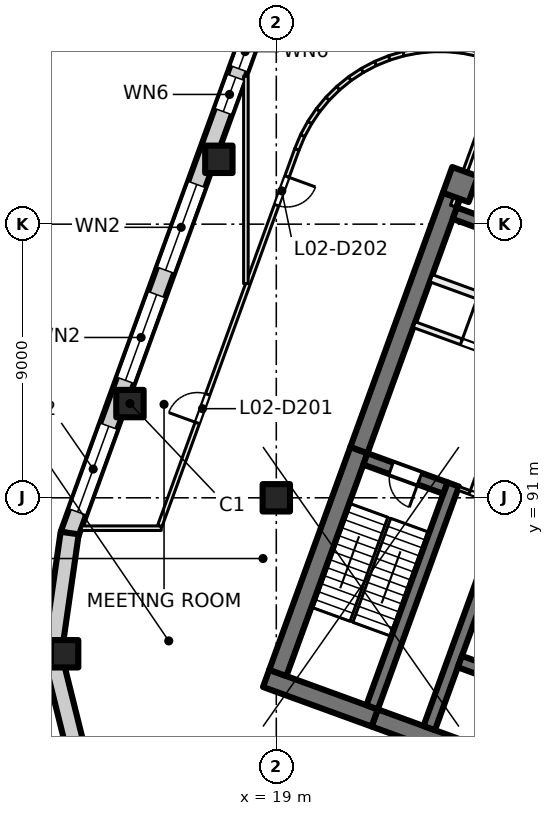
"""IFC4 building model, lengths in metres.
Left out: names, types, materials, properties, quantities, classifications, styles, units other than length and angle.
Written with IfcOpenShell. Run it as: python <this file> out.ifc"""

import sys

from ifc_helpers import new_model, si_unit, direction, frame, frame_2d, origin, origin_2d, place, context, subcontext, project, spatial, rectangle, extrude, element, fill, save


model = new_model("IFC4")
c1 = context("Model", 3, precision=1e-05, world=origin(), true_north=direction((0.0, 1.0)))
c2 = subcontext(c1, "Body", "Model", "MODEL_VIEW")
j1 = project(units=[si_unit("LENGTHUNIT", "METRE"), si_unit("PLANEANGLEUNIT", "RADIAN")], contexts=[c1])
p1 = place(None, origin())
s1 = spatial("IfcSite", under=j1, at=p1, CompositionType="ELEMENT")
p2 = place(p1, origin())
s2 = spatial("IfcBuilding", under=s1, at=p2, CompositionType="ELEMENT")
p3 = place(p2, frame((0.0, 0.0, 12.5)))
s3 = spatial("IfcBuildingStorey", under=s2, at=p3, CompositionType="ELEMENT", Elevation=12.5)
for number, where, z_axis, x_axis in (
    (1, (19.0, 91.0, 0.0), (0.0, 0.0, 1.0), (1.0, 0.0, 0.0)),
    (2, (12.038, 85.869, 0.0), (0.0, 0.0, 1.0), (1.0, 0.0, 0.0)),
    (3, (14.187, 94.099, 0.0), (0.0, 0.0, 1.0), (1.0, 0.0, 0.0)),
    (4, (17.111, 102.133, 0.0), (0.0, 0.0, 1.0), (1.0, 0.0, 0.0)),
    (5, (25.056, 101.303, 0.0), (0.0, 0.0, 1.0), (-0.342, -0.94, 0.0)),
):
    element("IfcColumn", number, at=place(p3, frame(where, z_axis=z_axis, x_axis=x_axis)), inside=s3, PredefinedType="COLUMN", context=c2, shape_type="SweptSolid", body=[
        extrude(rectangle(XDim=0.9, YDim=0.9, at=origin_2d()), origin(), (0.0, 0.0, 1.0), 5.0),
    ])
p4 = place(p3, frame((35.767, 78.835, 0.0), z_axis=(0.0, 0.0, 1.0), x_axis=(-0.939692894512, 0.342019391267, 0.0)))
e6 = element("IfcWall", 6, at=p4, inside=s3, PredefinedType="SHEAR", context=c2, shape_type="SweptSolid", body=[
    extrude(rectangle(XDim=14.4, YDim=0.6, at=frame_2d((7.2, 0.0))), origin(), (0.0, 0.0, 1.0), 5.0),
])
p5 = place(p3, frame((22.236, 83.76, 0.0), z_axis=(0.0, 0.0, 1.0), x_axis=(-0.939680822529, 0.342052557032, 0.0)))
e7 = element("IfcWall", 7, at=p5, inside=s3, PredefinedType="SHEAR", context=c2, shape_type="SweptSolid", body=[
    extrude(rectangle(XDim=3.8, YDim=0.6, at=frame_2d((1.9, 0.0))), origin(), (0.0, 0.0, 1.0), 5.0),
])
p6 = place(p3, frame((19.05, 85.239, 0.0), z_axis=(0.0, 0.0, 1.0), x_axis=(0.342016982193, 0.939693771338, 0.0)))
e8 = element("IfcWall", 8, at=p6, inside=s3, PredefinedType="SHEAR", context=c2, shape_type="SweptSolid", body=[
    extrude(rectangle(XDim=7.8, YDim=0.6, at=frame_2d((3.9, 0.0))), origin(), (0.0, 0.0, 1.0), 5.0),
])
p7 = place(p3, frame((21.717, 92.568, 0.0), z_axis=(0.0, 0.0, 1.0), x_axis=(0.342016162452, 0.939694069696, 0.0)))
e9 = element("IfcWall", 9, at=p7, inside=s3, PredefinedType="SHEAR", context=c2, shape_type="SweptSolid", body=[
    extrude(rectangle(XDim=8.9, YDim=0.6, at=frame_2d((4.45, 0.0))), origin(), (0.0, 0.0, 1.0), 5.0),
])
p8 = place(p3, frame((22.15, 84.11, 0.0), z_axis=(0.0, 0.0, 1.0), x_axis=(0.342016982193, 0.939693771338, 0.0)))
e10 = element("IfcWall", 10, at=p8, inside=s3, PredefinedType="SHEAR", context=c2, shape_type="SweptSolid", body=[
    extrude(rectangle(XDim=7.8, YDim=0.4, at=frame_2d((3.9, 0.0))), origin(), (0.0, 0.0, 1.0), 5.0),
])
p9 = place(p3, frame((24.562, 91.32, 0.0), z_axis=(0.0, 0.0, 1.0), x_axis=(-0.939717030584, 0.341953070509, 0.0)))
e11 = element("IfcWall", 11, at=p9, inside=s3, PredefinedType="SHEAR", context=c2, shape_type="SweptSolid", body=[
    extrude(rectangle(XDim=2.8, YDim=0.4, at=frame_2d((1.4, 0.0))), origin(), (0.0, 0.0, 1.0), 5.0),
])
p10 = place(p9, frame((0.9, 0.0, 0.0)))
e12 = element("IfcOpeningElement", 12, at=p10, cuts=e11, PredefinedType="OPENING", context=c2, shape_type="SweptSolid", body=[
    extrude(rectangle(XDim=1.0, YDim=2.1, at=frame_2d((0.5, 1.05))), frame((0.0, 0.21, 0.0), z_axis=(0.0, -1.0, 0.0), x_axis=(1.0, 0.0, 0.0)), (0.0, 0.0, 1.0), 0.42),
])
p11 = place(p3, frame((24.03, 83.426, 0.0), z_axis=(0.0, 0.0, 1.0), x_axis=(0.342014590177, 0.939694641948, 0.0)))
e13 = element("IfcWall", 13, at=p11, inside=s3, PredefinedType="SHEAR", context=c2, shape_type="SweptSolid", body=[
    extrude(rectangle(XDim=12.2, YDim=0.4, at=frame_2d((6.1, 0.0))), origin(), (0.0, 0.0, 1.0), 5.0),
])
p12 = place(p11, frame((7.9, 0.0, 0.0)))
e14 = element("IfcOpeningElement", 14, at=p12, cuts=e13, PredefinedType="OPENING", context=c2, shape_type="SweptSolid", body=[
    extrude(rectangle(XDim=1.1, YDim=2.1, at=frame_2d((0.55, 1.05))), frame((0.0, 0.21, 0.0), z_axis=(0.0, -1.0, 0.0), x_axis=(1.0, 0.0, 0.0)), (0.0, 0.0, 1.0), 0.42),
])
p13 = place(p3, frame((27.858, 84.587, 0.0), z_axis=(0.0, 0.0, 1.0), x_axis=(-0.939686455819, 0.342037080957, 0.0)))
e15 = element("IfcWall", 15, at=p13, inside=s3, PredefinedType="SHEAR", context=c2, shape_type="SweptSolid", body=[
    extrude(rectangle(XDim=3.0, YDim=0.4, at=frame_2d((1.5, 0.0))), origin(), (0.0, 0.0, 1.0), 5.0),
])
p14 = place(p3, frame((32.953, 97.418, 0.0), z_axis=(0.0, 0.0, 1.0), x_axis=(-0.93969060187, 0.342025690201, 0.0)))
e16 = element("IfcWall", 16, at=p14, inside=s3, PredefinedType="SHEAR", context=c2, shape_type="SweptSolid", body=[
    extrude(rectangle(XDim=8.6, YDim=0.4, at=frame_2d((4.3, 0.0))), origin(), (0.0, 0.0, 1.0), 5.0),
])
p15 = place(p3, frame((12.199, 89.809, 0.0), z_axis=(0.0, 0.0, 1.0), x_axis=(0.342022998908, 0.939691581434, 0.0)))
e17 = element("IfcWall", 17, at=p15, inside=s3, PredefinedType="SOLIDWALL", context=c2, shape_type="SweptSolid", body=[
    extrude(rectangle(XDim=47.334, YDim=0.6, at=frame_2d((23.667, 0.0))), origin(), (0.0, 0.0, 1.0), 4.6),
])
p16 = place(p15, frame((0.773, 0.0, 0.9)))
e18 = element("IfcOpeningElement", 18, at=p16, cuts=e17, PredefinedType="OPENING", context=c2, shape_type="SweptSolid", body=[
    extrude(rectangle(XDim=3.0, YDim=3.0, at=frame_2d((1.5, 1.5))), frame((0.0, 0.31, 0.0), z_axis=(0.0, -1.0, 0.0), x_axis=(1.0, 0.0, 0.0)), (0.0, 0.0, 1.0), 0.62),
])
p17 = place(p15, frame((5.379, 0.0, 0.9)))
e19 = element("IfcOpeningElement", 19, at=p17, cuts=e17, PredefinedType="OPENING", context=c2, shape_type="SweptSolid", body=[
    extrude(rectangle(XDim=3.0, YDim=3.0, at=frame_2d((1.5, 1.5))), frame((0.0, 0.31, 0.0), z_axis=(0.0, -1.0, 0.0), x_axis=(1.0, 0.0, 0.0)), (0.0, 0.0, 1.0), 0.62),
])
p18 = place(p15, frame((9.235, 0.0, 0.9)))
e20 = element("IfcOpeningElement", 20, at=p18, cuts=e17, PredefinedType="OPENING", context=c2, shape_type="SweptSolid", body=[
    extrude(rectangle(XDim=3.0, YDim=3.0, at=frame_2d((1.5, 1.5))), frame((0.0, 0.31, 0.0), z_axis=(0.0, -1.0, 0.0), x_axis=(1.0, 0.0, 0.0)), (0.0, 0.0, 1.0), 0.62),
])
p19 = place(p15, frame((14.786, 0.0, 0.9)))
e21 = element("IfcOpeningElement", 21, at=p19, cuts=e17, PredefinedType="OPENING", context=c2, shape_type="SweptSolid", body=[
    extrude(rectangle(XDim=1.2, YDim=3.0, at=frame_2d((0.6, 1.5))), frame((0.0, 0.31, 0.0), z_axis=(0.0, -1.0, 0.0), x_axis=(1.0, 0.0, 0.0)), (0.0, 0.0, 1.0), 0.62),
])
p20 = place(p15, frame((16.286, 0.0, 0.9)))
e22 = element("IfcOpeningElement", 22, at=p20, cuts=e17, PredefinedType="OPENING", context=c2, shape_type="SweptSolid", body=[
    extrude(rectangle(XDim=1.2, YDim=3.0, at=frame_2d((0.6, 1.5))), frame((0.0, 0.31, 0.0), z_axis=(0.0, -1.0, 0.0), x_axis=(1.0, 0.0, 0.0)), (0.0, 0.0, 1.0), 0.62),
])
p21 = place(p15, frame((18.118, 0.0, 0.9)))
e23 = element("IfcOpeningElement", 23, at=p21, cuts=e17, PredefinedType="OPENING", context=c2, shape_type="SweptSolid", body=[
    extrude(rectangle(XDim=1.2, YDim=3.0, at=frame_2d((0.6, 1.5))), frame((0.0, 0.31, 0.0), z_axis=(0.0, -1.0, 0.0), x_axis=(1.0, 0.0, 0.0)), (0.0, 0.0, 1.0), 0.62),
])
p22 = place(p15, frame((19.618, 0.0, 0.9)))
e24 = element("IfcOpeningElement", 24, at=p22, cuts=e17, PredefinedType="OPENING", context=c2, shape_type="SweptSolid", body=[
    extrude(rectangle(XDim=1.2, YDim=3.0, at=frame_2d((0.6, 1.5))), frame((0.0, 0.31, 0.0), z_axis=(0.0, -1.0, 0.0), x_axis=(1.0, 0.0, 0.0)), (0.0, 0.0, 1.0), 0.62),
])
p23 = place(p15, frame((22.452, 0.0, 0.9)))
e25 = element("IfcOpeningElement", 25, at=p23, cuts=e17, PredefinedType="OPENING", context=c2, shape_type="SweptSolid", body=[
    extrude(rectangle(XDim=3.0, YDim=3.0, at=frame_2d((1.5, 1.5))), frame((0.0, 0.31, 0.0), z_axis=(0.0, -1.0, 0.0), x_axis=(1.0, 0.0, 0.0)), (0.0, 0.0, 1.0), 0.62),
])
p24 = place(p15, frame((26.458, 0.0, 0.9)))
e26 = element("IfcOpeningElement", 26, at=p24, cuts=e17, PredefinedType="OPENING", context=c2, shape_type="SweptSolid", body=[
    extrude(rectangle(XDim=3.0, YDim=3.0, at=frame_2d((1.5, 1.5))), frame((0.0, 0.31, 0.0), z_axis=(0.0, -1.0, 0.0), x_axis=(1.0, 0.0, 0.0)), (0.0, 0.0, 1.0), 0.62),
])
p25 = place(p15, frame((31.064, 0.0, 0.9)))
e27 = element("IfcOpeningElement", 27, at=p25, cuts=e17, PredefinedType="OPENING", context=c2, shape_type="SweptSolid", body=[
    extrude(rectangle(XDim=3.0, YDim=3.0, at=frame_2d((1.5, 1.5))), frame((0.0, 0.31, 0.0), z_axis=(0.0, -1.0, 0.0), x_axis=(1.0, 0.0, 0.0)), (0.0, 0.0, 1.0), 0.62),
])
p26 = place(p15, frame((36.029, 0.0, 0.9)))
e28 = element("IfcOpeningElement", 28, at=p26, cuts=e17, PredefinedType="OPENING", context=c2, shape_type="SweptSolid", body=[
    extrude(rectangle(XDim=1.2, YDim=3.0, at=frame_2d((0.6, 1.5))), frame((0.0, 0.31, 0.0), z_axis=(0.0, -1.0, 0.0), x_axis=(1.0, 0.0, 0.0)), (0.0, 0.0, 1.0), 0.62),
])
p27 = place(p15, frame((39.676, 0.0, 0.9)))
e29 = element("IfcOpeningElement", 29, at=p27, cuts=e17, PredefinedType="OPENING", context=c2, shape_type="SweptSolid", body=[
    extrude(rectangle(XDim=3.0, YDim=3.0, at=frame_2d((1.5, 1.5))), frame((0.0, 0.31, 0.0), z_axis=(0.0, -1.0, 0.0), x_axis=(1.0, 0.0, 0.0)), (0.0, 0.0, 1.0), 0.62),
])
p28 = place(p15, frame((43.531, 0.0, 0.9)))
e30 = element("IfcOpeningElement", 30, at=p28, cuts=e17, PredefinedType="OPENING", context=c2, shape_type="SweptSolid", body=[
    extrude(rectangle(XDim=3.0, YDim=3.0, at=frame_2d((1.5, 1.5))), frame((0.0, 0.31, 0.0), z_axis=(0.0, -1.0, 0.0), x_axis=(1.0, 0.0, 0.0)), (0.0, 0.0, 1.0), 0.62),
])
p29 = place(p3, frame((11.641, 85.92, 0.0), z_axis=(0.0, 0.0, 1.0), x_axis=(0.142240980655, 0.989832058191, 0.0)))
e31 = element("IfcWall", 31, at=p29, inside=s3, PredefinedType="SOLIDWALL", context=c2, shape_type="SweptSolid", body=[
    extrude(rectangle(XDim=3.961, YDim=0.6, at=frame_2d((1.981, 0.0))), origin(), (0.0, 0.0, 1.0), 4.6),
])
p30 = place(p3, frame((12.571, 82.061, 0.0), z_axis=(0.0, 0.0, 1.0), x_axis=(-0.240896747667, 0.970550749298, 0.0)))
e32 = element("IfcWall", 32, at=p30, inside=s3, PredefinedType="SOLIDWALL", context=c2, shape_type="SweptSolid", body=[
    extrude(rectangle(XDim=3.962, YDim=0.6, at=frame_2d((1.981, 0.0))), origin(), (0.0, 0.0, 1.0), 4.6),
])
p31 = place(p3, frame((23.538, 96.694, 0.0), z_axis=(0.0, 0.0, 1.0), x_axis=(0.939691552312, -0.342023078919, 0.0)))
e33 = element("IfcWall", 33, at=p31, inside=s3, PredefinedType="PARTITIONING", context=c2, shape_type="SweptSolid", body=[
    extrude(rectangle(XDim=8.4, YDim=0.2, at=frame_2d((4.2, 0.0))), origin(), (0.0, 0.0, 1.0), 4.6),
])
p32 = place(p31, frame((1.65, 0.0, 0.0)))
e34 = element("IfcOpeningElement", 34, at=p32, cuts=e33, PredefinedType="OPENING", context=c2, shape_type="SweptSolid", body=[
    extrude(rectangle(XDim=1.5, YDim=2.1, at=frame_2d((0.75, 1.05))), frame((0.0, 0.11, 0.0), z_axis=(0.0, -1.0, 0.0), x_axis=(1.0, 0.0, 0.0)), (0.0, 0.0, 1.0), 0.22),
])
p33 = place(p3, frame((24.094, 98.221, 0.0), z_axis=(0.0, 0.0, 1.0), x_axis=(0.939691552312, -0.342023078919, 0.0)))
e35 = element("IfcWall", 35, at=p33, inside=s3, PredefinedType="PARTITIONING", context=c2, shape_type="SweptSolid", body=[
    extrude(rectangle(XDim=8.4, YDim=0.25, at=frame_2d((4.2, 0.0))), origin(), (0.0, 0.0, 1.0), 4.6),
])
p34 = place(p33, frame((5.925, 0.0, 0.0)))
e36 = element("IfcOpeningElement", 36, at=p34, cuts=e35, PredefinedType="OPENING", context=c2, shape_type="SweptSolid", body=[
    extrude(rectangle(XDim=0.8, YDim=2.1, at=frame_2d((0.4, 1.05))), frame((0.0, 0.135, 0.0), z_axis=(0.0, -1.0, 0.0), x_axis=(1.0, 0.0, 0.0)), (0.0, 0.0, 1.0), 0.27),
])
p35 = place(p33, frame((1.675, 0.0, 0.0)))
e37 = element("IfcOpeningElement", 37, at=p35, cuts=e35, PredefinedType="OPENING", context=c2, shape_type="SweptSolid", body=[
    extrude(rectangle(XDim=0.8, YDim=2.1, at=frame_2d((0.4, 1.05))), frame((0.0, 0.135, 0.0), z_axis=(0.0, -1.0, 0.0), x_axis=(1.0, 0.0, 0.0)), (0.0, 0.0, 1.0), 0.27),
])
p36 = place(p3, frame((24.985, 91.312, 0.0), z_axis=(0.0, 0.0, 1.0), x_axis=(0.939708740826, -0.341975850632, 0.0)))
e38 = element("IfcWall", 38, at=p36, inside=s3, PredefinedType="PARTITIONING", context=c2, shape_type="SweptSolid", body=[
    extrude(rectangle(XDim=1.6, YDim=0.125, at=frame_2d((0.8, 0.0))), origin(), (0.0, 0.0, 1.0), 4.6),
])
p37 = place(p36, frame((0.4, 0.0, 0.0)))
e39 = element("IfcOpeningElement", 39, at=p37, cuts=e38, PredefinedType="OPENING", context=c2, shape_type="SweptSolid", body=[
    extrude(rectangle(XDim=0.8, YDim=2.1, at=frame_2d((0.4, 1.05))), frame((0.0, 0.073, 0.0), z_axis=(0.0, -1.0, 0.0), x_axis=(1.0, 0.0, 0.0)), (0.0, 0.0, 1.0), 0.145),
])
p38 = place(p3, frame((12.588, 90.0, 0.0), z_axis=(0.0, 0.0, 1.0), x_axis=(1.0, 0.0, 0.0)))
e40 = element("IfcWall", 40, at=p38, inside=s3, PredefinedType="PARTITIONING", context=c2, shape_type="SweptSolid", body=[
    extrude(rectangle(XDim=2.629, YDim=0.15, at=frame_2d((1.314, 0.0))), origin(), (0.0, 0.0, 1.0), 4.6),
])
p39 = place(p3, frame((15.169, 90.075, 0.0), z_axis=(0.0, 0.0, 1.0), x_axis=(0.342068648332, 0.93967496499, 0.0)))
e41 = element("IfcWall", 41, at=p39, inside=s3, PredefinedType="PARTITIONING", context=c2, shape_type="SweptSolid", body=[
    extrude(rectangle(XDim=13.185, YDim=0.15, at=frame_2d((6.592, 0.0))), origin(), (0.0, 0.0, 1.0), 4.6),
])
p40 = place(p39, frame((3.604, 0.0, 0.0)))
e42 = element("IfcOpeningElement", 42, at=p40, cuts=e41, PredefinedType="OPENING", context=c2, shape_type="SweptSolid", body=[
    extrude(rectangle(XDim=1.0, YDim=2.1, at=frame_2d((0.5, 1.05))), frame((0.0, 0.085, 0.0), z_axis=(0.0, -1.0, 0.0), x_axis=(1.0, 0.0, 0.0)), (0.0, 0.0, 1.0), 0.17),
])
p41 = place(p39, frame((11.227, 0.0, 0.0)))
e43 = element("IfcOpeningElement", 43, at=p41, cuts=e41, PredefinedType="OPENING", context=c2, shape_type="SweptSolid", body=[
    extrude(rectangle(XDim=1.0, YDim=2.1, at=frame_2d((0.5, 1.05))), frame((0.0, 0.085, 0.0), z_axis=(0.0, -1.0, 0.0), x_axis=(1.0, 0.0, 0.0)), (0.0, 0.0, 1.0), 0.17),
])
p42 = place(p3, frame((18.0, 98.046, 0.0), z_axis=(0.0, 0.0, 1.0), x_axis=(0.0, 1.0, 0.0)))
e44 = element("IfcWall", 44, at=p42, inside=s3, PredefinedType="PARTITIONING", context=c2, shape_type="SweptSolid", body=[
    extrude(rectangle(XDim=6.823, YDim=0.15, at=frame_2d((3.412, 0.0))), origin(), (0.0, 0.0, 1.0), 4.6),
])
p43 = place(p3, frame((19.677, 102.46, 0.0), z_axis=(0.0, 0.0, 1.0), x_axis=(0.386429931229, 0.922318767157, 0.0)))
e45 = element("IfcWall", 45, at=p43, inside=s3, PredefinedType="PARTITIONING", context=c2, shape_type="SweptSolid", body=[
    extrude(rectangle(XDim=0.497, YDim=0.15, at=frame_2d((0.248, 0.0))), origin(), (0.0, 0.0, 1.0), 4.6),
])
p44 = place(p3, frame((19.866, 102.912, 0.0), z_axis=(0.0, 0.0, 1.0), x_axis=(0.478336447807, 0.878176658025, 0.0)))
e46 = element("IfcWall", 46, at=p44, inside=s3, PredefinedType="PARTITIONING", context=c2, shape_type="SweptSolid", body=[
    extrude(rectangle(XDim=0.498, YDim=0.15, at=frame_2d((0.249, 0.0))), origin(), (0.0, 0.0, 1.0), 4.6),
])
p45 = place(p3, frame((20.1, 103.343, 0.0), z_axis=(0.0, 0.0, 1.0), x_axis=(0.559439200494, 0.828871389874, 0.0)))
e47 = element("IfcWall", 47, at=p45, inside=s3, PredefinedType="PARTITIONING", context=c2, shape_type="SweptSolid", body=[
    extrude(rectangle(XDim=0.498, YDim=0.15, at=frame_2d((0.249, 0.0))), origin(), (0.0, 0.0, 1.0), 4.6),
])
p46 = place(p3, frame((20.375, 103.75, 0.0), z_axis=(0.0, 0.0, 1.0), x_axis=(0.637426997618, 0.77051075444, 0.0)))
e48 = element("IfcWall", 48, at=p46, inside=s3, PredefinedType="PARTITIONING", context=c2, shape_type="SweptSolid", body=[
    extrude(rectangle(XDim=0.497, YDim=0.15, at=frame_2d((0.249, 0.0))), origin(), (0.0, 0.0, 1.0), 4.6),
])
p47 = place(p3, frame((20.687, 104.127, 0.0), z_axis=(0.0, 0.0, 1.0), x_axis=(0.711007970504, 0.703183948821, 0.0)))
e49 = element("IfcWall", 49, at=p47, inside=s3, PredefinedType="PARTITIONING", context=c2, shape_type="SweptSolid", body=[
    extrude(rectangle(XDim=0.499, YDim=0.15, at=frame_2d((0.25, 0.0))), origin(), (0.0, 0.0, 1.0), 4.6),
])
p48 = place(p3, frame((21.036, 104.473, 0.0), z_axis=(0.0, 0.0, 1.0), x_axis=(0.77650322697, 0.630113274345, 0.0)))
e50 = element("IfcWall", 50, at=p48, inside=s3, PredefinedType="PARTITIONING", context=c2, shape_type="SweptSolid", body=[
    extrude(rectangle(XDim=0.499, YDim=0.15, at=frame_2d((0.249, 0.0))), origin(), (0.0, 0.0, 1.0), 4.6),
])
for number, where, z_axis, x_axis in (
    (51, (21.417, 104.783, 0.0), (0.0, 0.0, 1.0), (0.835, 0.55, 0.0)),
    (52, (21.827, 105.053, 0.0), (0.0, 0.0, 1.0), (0.884, 0.468, 0.0)),
):
    element("IfcWall", number, at=place(p3, frame(where, z_axis=z_axis, x_axis=x_axis)), inside=s3, PredefinedType="PARTITIONING", context=c2, shape_type="SweptSolid", body=[
        extrude(rectangle(XDim=0.498, YDim=0.15, at=frame_2d((0.249, 0.0))), origin(), (0.0, 0.0, 1.0), 4.6),
    ])
p49 = place(p3, frame((22.261, 105.283, 0.0), z_axis=(0.0, 0.0, 1.0), x_axis=(0.926359379867, 0.376640809436, 0.0)))
e53 = element("IfcWall", 53, at=p49, inside=s3, PredefinedType="PARTITIONING", context=c2, shape_type="SweptSolid", body=[
    extrude(rectangle(XDim=0.497, YDim=0.15, at=frame_2d((0.248, 0.0))), origin(), (0.0, 0.0, 1.0), 4.6),
])
p50 = place(p3, frame((22.714, 105.468, 0.0), z_axis=(0.0, 0.0, 1.0), x_axis=(0.958511041414, 0.285055404243, 0.0)))
e54 = element("IfcWall", 54, at=p50, inside=s3, PredefinedType="PARTITIONING", context=c2, shape_type="SweptSolid", body=[
    extrude(rectangle(XDim=0.499, YDim=0.15, at=frame_2d((0.249, 0.0))), origin(), (0.0, 0.0, 1.0), 4.6),
])
p51 = place(p3, frame((23.184, 105.608, 0.0), z_axis=(0.0, 0.0, 1.0), x_axis=(0.981729772821, 0.190280459207, 0.0)))
e55 = element("IfcWall", 55, at=p51, inside=s3, PredefinedType="PARTITIONING", context=c2, shape_type="SweptSolid", body=[
    extrude(rectangle(XDim=0.499, YDim=0.15, at=frame_2d((0.25, 0.0))), origin(), (0.0, 0.0, 1.0), 4.6),
])
p52 = place(p3, frame((23.666, 105.702, 0.0), z_axis=(0.0, 0.0, 1.0), x_axis=(0.995719029091, 0.092431678044, 0.0)))
e56 = element("IfcWall", 56, at=p52, inside=s3, PredefinedType="PARTITIONING", context=c2, shape_type="SweptSolid", body=[
    extrude(rectangle(XDim=0.499, YDim=0.15, at=frame_2d((0.25, 0.0))), origin(), (0.0, 0.0, 1.0), 4.6),
])
p53 = place(p3, frame((24.645, 105.745, 0.0), z_axis=(0.0, 0.0, 1.0), x_axis=(0.994752095055, -0.102314560958, 0.0)))
e57 = element("IfcWall", 57, at=p53, inside=s3, PredefinedType="PARTITIONING", context=c2, shape_type="SweptSolid", body=[
    extrude(rectangle(XDim=0.499, YDim=0.15, at=frame_2d((0.25, 0.0))), origin(), (0.0, 0.0, 1.0), 4.6),
])
p54 = place(p3, frame((24.8, 100.598, 0.0), z_axis=(0.0, 0.0, 1.0), x_axis=(0.34194689438, 0.939719277989, 0.0)))
e58 = element("IfcWall", 58, at=p54, inside=s3, PredefinedType="PARTITIONING", context=c2, shape_type="SweptSolid", body=[
    extrude(rectangle(XDim=5.001, YDim=0.15, at=frame_2d((2.5, 0.0))), origin(), (0.0, 0.0, 1.0), 4.6),
])
p55 = place(p3, frame((25.133, 105.695, 0.0), z_axis=(0.0, 0.0, 1.0), x_axis=(0.979686550711, -0.200534940485, 0.0)))
e59 = element("IfcWall", 59, at=p55, inside=s3, PredefinedType="PARTITIONING", context=c2, shape_type="SweptSolid", body=[
    extrude(rectangle(XDim=0.499, YDim=0.15, at=frame_2d((0.25, 0.0))), origin(), (0.0, 0.0, 1.0), 4.6),
])
p56 = place(p16, origin())
e60 = element("IfcWindow", 60, at=p56, inside=s3, PartitioningType="SINGLE_PANEL", PredefinedType="WINDOW", context=c2, shape_type="SweptSolid", body=[
    extrude(rectangle(XDim=3.0, YDim=3.0, at=frame_2d((1.5, 1.5))), frame((0.0, 0.03, 0.0), z_axis=(0.0, -1.0, 0.0), x_axis=(1.0, 0.0, 0.0)), (0.0, 0.0, 1.0), 0.06),
])
fill(e18, e60)
p57 = place(p17, origin())
e61 = element("IfcWindow", 61, at=p57, inside=s3, PartitioningType="SINGLE_PANEL", PredefinedType="WINDOW", context=c2, shape_type="SweptSolid", body=[
    extrude(rectangle(XDim=3.0, YDim=3.0, at=frame_2d((1.5, 1.5))), frame((0.0, 0.03, 0.0), z_axis=(0.0, -1.0, 0.0), x_axis=(1.0, 0.0, 0.0)), (0.0, 0.0, 1.0), 0.06),
])
fill(e19, e61)
p58 = place(p18, origin())
e62 = element("IfcWindow", 62, at=p58, inside=s3, PartitioningType="SINGLE_PANEL", PredefinedType="WINDOW", context=c2, shape_type="SweptSolid", body=[
    extrude(rectangle(XDim=3.0, YDim=3.0, at=frame_2d((1.5, 1.5))), frame((0.0, 0.03, 0.0), z_axis=(0.0, -1.0, 0.0), x_axis=(1.0, 0.0, 0.0)), (0.0, 0.0, 1.0), 0.06),
])
fill(e20, e62)
p59 = place(p19, origin())
e63 = element("IfcWindow", 63, at=p59, inside=s3, PartitioningType="SINGLE_PANEL", PredefinedType="WINDOW", context=c2, shape_type="SweptSolid", body=[
    extrude(rectangle(XDim=1.2, YDim=3.0, at=frame_2d((0.6, 1.5))), frame((0.0, 0.03, 0.0), z_axis=(0.0, -1.0, 0.0), x_axis=(1.0, 0.0, 0.0)), (0.0, 0.0, 1.0), 0.06),
])
fill(e21, e63)
p60 = place(p20, origin())
e64 = element("IfcWindow", 64, at=p60, inside=s3, PartitioningType="SINGLE_PANEL", PredefinedType="WINDOW", context=c2, shape_type="SweptSolid", body=[
    extrude(rectangle(XDim=1.2, YDim=3.0, at=frame_2d((0.6, 1.5))), frame((0.0, 0.03, 0.0), z_axis=(0.0, -1.0, 0.0), x_axis=(1.0, 0.0, 0.0)), (0.0, 0.0, 1.0), 0.06),
])
fill(e22, e64)
p61 = place(p32, origin())
e65 = element("IfcDoor", 65, at=p61, inside=s3, OperationType="DOUBLE_DOOR_SINGLE_SWING", PredefinedType="DOOR", context=c2, shape_type="SweptSolid", body=[
    extrude(rectangle(XDim=1.5, YDim=2.1, at=frame_2d((0.75, 1.05))), frame((0.0, 0.025, 0.0), z_axis=(0.0, -1.0, 0.0), x_axis=(1.0, 0.0, 0.0)), (0.0, 0.0, 1.0), 0.05),
])
fill(e34, e65)
p62 = place(p10, origin())
e66 = element("IfcDoor", 66, at=p62, inside=s3, OperationType="SINGLE_SWING_LEFT", PredefinedType="DOOR", context=c2, shape_type="SweptSolid", body=[
    extrude(rectangle(XDim=1.0, YDim=2.1, at=frame_2d((0.5, 1.05))), frame((0.0, 0.025, 0.0), z_axis=(0.0, -1.0, 0.0), x_axis=(1.0, 0.0, 0.0)), (0.0, 0.0, 1.0), 0.05),
])
fill(e12, e66)
p63 = place(p37, origin())
e67 = element("IfcDoor", 67, at=p63, inside=s3, OperationType="SINGLE_SWING_RIGHT", PredefinedType="DOOR", context=c2, shape_type="SweptSolid", body=[
    extrude(rectangle(XDim=0.8, YDim=2.1, at=frame_2d((0.4, 1.05))), frame((0.0, 0.025, 0.0), z_axis=(0.0, -1.0, 0.0), x_axis=(1.0, 0.0, 0.0)), (0.0, 0.0, 1.0), 0.05),
])
fill(e39, e67)
p64 = place(p40, origin())
e68 = element("IfcDoor", 68, at=p64, inside=s3, OperationType="SINGLE_SWING_LEFT", PredefinedType="DOOR", context=c2, shape_type="SweptSolid", body=[
    extrude(rectangle(XDim=1.0, YDim=2.1, at=frame_2d((0.5, 1.05))), frame((0.0, 0.025, 0.0), z_axis=(0.0, -1.0, 0.0), x_axis=(1.0, 0.0, 0.0)), (0.0, 0.0, 1.0), 0.05),
])
fill(e42, e68)
p65 = place(p41, origin())
e69 = element("IfcDoor", 69, at=p65, inside=s3, OperationType="SINGLE_SWING_RIGHT", PredefinedType="DOOR", context=c2, shape_type="SweptSolid", body=[
    extrude(rectangle(XDim=1.0, YDim=2.1, at=frame_2d((0.5, 1.05))), frame((0.0, 0.025, 0.0), z_axis=(0.0, -1.0, 0.0), x_axis=(1.0, 0.0, 0.0)), (0.0, 0.0, 1.0), 0.05),
])
fill(e43, e69)
save(model, sys.argv[1])
